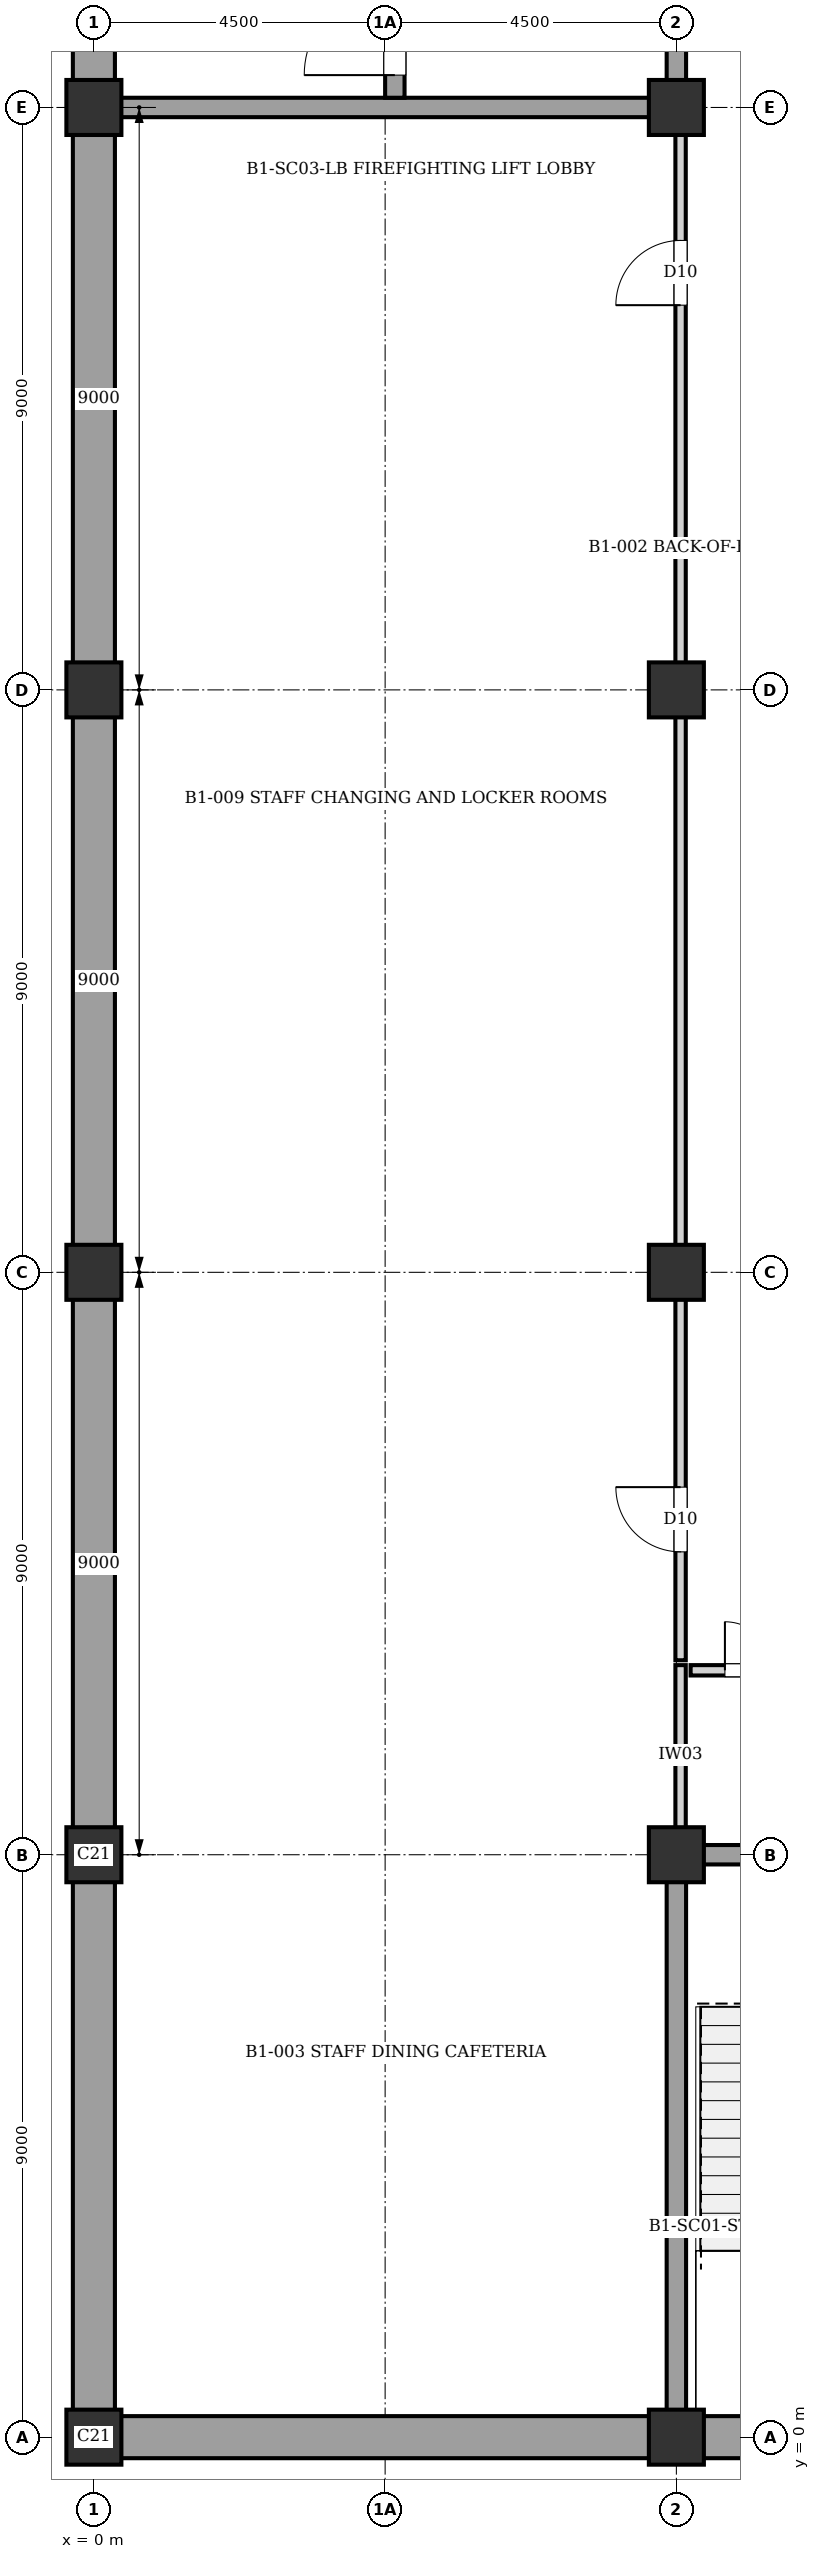
"""IFC4 building model, lengths in metres.
Left out: names, types, materials, properties, quantities, classifications, styles, units other than length and angle.
Written with IfcOpenShell. Run it as: python <this file> out.ifc"""

import sys

from ifc_helpers import new_model, si_unit, direction, frame, frame_2d, origin, origin_2d, place, context, subcontext, project, spatial, rectangle, extrude, element, fill, save


model = new_model("IFC4")
c1 = context("Model", 3, precision=1e-05, world=origin(), true_north=direction((0.0, 1.0)))
c2 = subcontext(c1, "Body", "Model", "MODEL_VIEW")
j1 = project(units=[si_unit("LENGTHUNIT", "METRE"), si_unit("PLANEANGLEUNIT", "RADIAN")], contexts=[c1])
p1 = place(None, origin())
s1 = spatial("IfcSite", under=j1, at=p1, CompositionType="ELEMENT")
p2 = place(p1, origin())
s2 = spatial("IfcBuilding", under=s1, at=p2, CompositionType="ELEMENT")
p3 = place(p2, frame((0.0, 0.0, -4.48)))
s3 = spatial("IfcBuildingStorey", under=s2, at=p3, CompositionType="ELEMENT", Elevation=-4.48)
for number, where, z_axis, x_axis in (
    (1, (0.0, 0.0, 0.0), (0.0, 0.0, 1.0), (1.0, 0.0, 0.0)),
    (2, (0.0, 9.0, 0.0), (0.0, 0.0, 1.0), (1.0, 0.0, 0.0)),
    (3, (0.0, 18.0, 0.0), (0.0, 0.0, 1.0), (1.0, 0.0, 0.0)),
    (4, (0.0, 27.0, 0.0), (0.0, 0.0, 1.0), (1.0, 0.0, 0.0)),
    (5, (0.0, 36.0, 0.0), (0.0, 0.0, 1.0), (1.0, 0.0, 0.0)),
    (6, (9.0, 0.0, 0.0), (0.0, 0.0, 1.0), (1.0, 0.0, 0.0)),
    (7, (9.0, 9.0, 0.0), (0.0, 0.0, 1.0), (1.0, 0.0, 0.0)),
    (8, (9.0, 18.0, 0.0), (0.0, 0.0, 1.0), (1.0, 0.0, 0.0)),
    (9, (9.0, 27.0, 0.0), (0.0, 0.0, 1.0), (1.0, 0.0, 0.0)),
    (10, (9.0, 36.0, 0.0), (0.0, 0.0, 1.0), (1.0, 0.0, 0.0)),
):
    element("IfcColumn", number, at=place(p3, frame(where, z_axis=z_axis, x_axis=x_axis)), inside=s3, PredefinedType="COLUMN", context=c2, shape_type="SweptSolid", body=[
        extrude(rectangle(XDim=0.85, YDim=0.85, at=origin_2d()), origin(), (0.0, 0.0, 1.0), 4.48),
    ])
for number, where, z_axis, x_axis in (
    (11, (18.0, 0.0, 0.0), (0.0, 0.0, 1.0), (-1.0, 0.0, 0.0)),
    (12, (9.0, 0.0, 0.0), (0.0, 0.0, 1.0), (-1.0, 0.0, 0.0)),
    (13, (0.0, 0.0, 0.0), (0.0, 0.0, 1.0), (0.0, 1.0, 0.0)),
    (14, (0.0, 9.0, 0.0), (0.0, 0.0, 1.0), (0.0, 1.0, 0.0)),
    (15, (0.0, 18.0, 0.0), (0.0, 0.0, 1.0), (0.0, 1.0, 0.0)),
    (16, (0.0, 27.0, 0.0), (0.0, 0.0, 1.0), (0.0, 1.0, 0.0)),
    (17, (0.0, 36.0, 0.0), (0.0, 0.0, 1.0), (0.0, 1.0, 0.0)),
):
    element("IfcWall", number, at=place(p3, frame(where, z_axis=z_axis, x_axis=x_axis)), inside=s3, PredefinedType="USERDEFINED", context=c2, shape_type="SweptSolid", body=[
        extrude(rectangle(XDim=9.0, YDim=0.65, at=frame_2d((4.5, 0.0))), origin(), (0.0, 0.0, 1.0), 4.22),
    ])
p4 = place(p3, frame((9.0, 9.0, 0.0), z_axis=(0.0, 0.0, 1.0), x_axis=(1.0, 0.0, 0.0)))
e18 = element("IfcWall", 18, at=p4, inside=s3, PredefinedType="SHEAR", context=c2, shape_type="SweptSolid", body=[
    extrude(rectangle(XDim=9.0, YDim=0.3, at=frame_2d((4.5, 0.0))), origin(), (0.0, 0.0, 1.0), 4.22),
])
p5 = place(p4, frame((5.95, 0.0, 0.0)))
e19 = element("IfcOpeningElement", 19, at=p5, cuts=e18, PredefinedType="OPENING", context=c2, shape_type="SweptSolid", body=[
    extrude(rectangle(XDim=1.6, YDim=2.1, at=frame_2d((0.8, 1.05))), frame((0.0, 0.16, 0.0), z_axis=(0.0, -1.0, 0.0), x_axis=(1.0, 0.0, 0.0)), (0.0, 0.0, 1.0), 0.32),
])
for number, where, z_axis, x_axis in (
    (20, (9.0, 0.0, 0.0), (0.0, 0.0, 1.0), (0.0, 1.0, 0.0)),
    (21, (0.0, 36.0, 0.0), (0.0, 0.0, 1.0), (1.0, 0.0, 0.0)),
):
    element("IfcWall", number, at=place(p3, frame(where, z_axis=z_axis, x_axis=x_axis)), inside=s3, PredefinedType="SHEAR", context=c2, shape_type="SweptSolid", body=[
        extrude(rectangle(XDim=9.0, YDim=0.3, at=frame_2d((4.5, 0.0))), origin(), (0.0, 0.0, 1.0), 4.22),
    ])
p6 = place(p3, frame((9.0, 36.0, 0.0), z_axis=(0.0, 0.0, 1.0), x_axis=(0.0, 1.0, 0.0)))
e22 = element("IfcWall", 22, at=p6, inside=s3, PredefinedType="SHEAR", context=c2, shape_type="SweptSolid", body=[
    extrude(rectangle(XDim=9.0, YDim=0.3, at=frame_2d((4.5, 0.0))), origin(), (0.0, 0.0, 1.0), 4.22),
])
p7 = place(p6, frame((1.95, 0.0, 0.0)))
e23 = element("IfcOpeningElement", 23, at=p7, cuts=e22, PredefinedType="OPENING", context=c2, shape_type="SweptSolid", body=[
    extrude(rectangle(XDim=1.6, YDim=2.1, at=frame_2d((0.8, 1.05))), frame((0.0, 0.16, 0.0), z_axis=(0.0, -1.0, 0.0), x_axis=(1.0, 0.0, 0.0)), (0.0, 0.0, 1.0), 0.32),
])
p8 = place(p3, frame((4.65, 36.15, 0.0), z_axis=(0.0, 0.0, 1.0), x_axis=(0.0, 1.0, 0.0)))
e24 = element("IfcWall", 24, at=p8, inside=s3, PredefinedType="SHEAR", context=c2, shape_type="SweptSolid", body=[
    extrude(rectangle(XDim=8.7, YDim=0.3, at=frame_2d((4.35, 0.0))), origin(), (0.0, 0.0, 1.0), 4.22),
])
p9 = place(p8, frame((0.35, 0.0, 0.0)))
e25 = element("IfcOpeningElement", 25, at=p9, cuts=e24, PredefinedType="OPENING", context=c2, shape_type="SweptSolid", body=[
    extrude(rectangle(XDim=1.4, YDim=2.02, at=frame_2d((0.7, 1.01))), frame((0.0, 0.16, 0.0), z_axis=(0.0, -1.0, 0.0), x_axis=(1.0, 0.0, 0.0)), (0.0, 0.0, 1.0), 0.32),
])
p10 = place(p3, frame((9.065, 9.155, 0.0), z_axis=(0.0, 0.0, 1.0), x_axis=(0.0, 1.0, 0.0)))
e26 = element("IfcWall", 26, at=p10, inside=s3, PredefinedType="PARTITIONING", context=c2, shape_type="SweptSolid", body=[
    extrude(rectangle(XDim=2.775, YDim=0.16, at=frame_2d((1.387, 0.0))), origin(), (0.0, 0.0, 1.0), 3.32),
])
p11 = place(p3, frame((9.22, 11.85, 0.0), z_axis=(0.0, 0.0, 1.0), x_axis=(1.0, 0.0, 0.0)))
e27 = element("IfcWall", 27, at=p11, inside=s3, PredefinedType="PARTITIONING", context=c2, shape_type="SweptSolid", body=[
    extrude(rectangle(XDim=2.56, YDim=0.16, at=frame_2d((1.28, 0.0))), origin(), (0.0, 0.0, 1.0), 4.22),
])
p12 = place(p11, frame((0.53, 0.0, 0.0)))
e28 = element("IfcOpeningElement", 28, at=p12, cuts=e27, PredefinedType="OPENING", context=c2, shape_type="SweptSolid", body=[
    extrude(rectangle(XDim=1.5, YDim=2.1, at=frame_2d((0.75, 1.05))), frame((0.0, 0.09, 0.0), z_axis=(0.0, -1.0, 0.0), x_axis=(1.0, 0.0, 0.0)), (0.0, 0.0, 1.0), 0.18),
])
p13 = place(p3, frame((9.065, 12.005, 0.0), z_axis=(0.0, 0.0, 1.0), x_axis=(0.0, 1.0, 0.0)))
e29 = element("IfcWall", 29, at=p13, inside=s3, PredefinedType="PARTITIONING", context=c2, shape_type="SweptSolid", body=[
    extrude(rectangle(XDim=5.725, YDim=0.16, at=frame_2d((2.863, 0.0))), origin(), (0.0, 0.0, 1.0), 3.32),
])
p14 = place(p13, frame((1.676, 0.0, 0.0)))
e30 = element("IfcOpeningElement", 30, at=p14, cuts=e29, PredefinedType="OPENING", context=c2, shape_type="SweptSolid", body=[
    extrude(rectangle(XDim=1.0, YDim=2.1, at=frame_2d((0.5, 1.05))), frame((0.0, 0.09, 0.0), z_axis=(0.0, -1.0, 0.0), x_axis=(1.0, 0.0, 0.0)), (0.0, 0.0, 1.0), 0.18),
])
p15 = place(p3, frame((9.065, 18.07, 0.0), z_axis=(0.0, 0.0, 1.0), x_axis=(0.0, 1.0, 0.0)))
e31 = element("IfcWall", 31, at=p15, inside=s3, PredefinedType="PARTITIONING", context=c2, shape_type="SweptSolid", body=[
    extrude(rectangle(XDim=17.775, YDim=0.16, at=frame_2d((8.887, 0.0))), origin(), (0.0, 0.0, 1.0), 3.32),
])
p16 = place(p15, frame((14.875, 0.0, 0.0)))
e32 = element("IfcOpeningElement", 32, at=p16, cuts=e31, PredefinedType="OPENING", context=c2, shape_type="SweptSolid", body=[
    extrude(rectangle(XDim=1.0, YDim=2.1, at=frame_2d((0.5, 1.05))), frame((0.0, 0.09, 0.0), z_axis=(0.0, -1.0, 0.0), x_axis=(1.0, 0.0, 0.0)), (0.0, 0.0, 1.0), 0.18),
])
p17 = place(p9, origin())
e33 = element("IfcDoor", 33, at=p17, inside=s3, OperationType="SINGLE_SWING_LEFT", PredefinedType="DOOR", context=c2, shape_type="SweptSolid", body=[
    extrude(rectangle(XDim=1.4, YDim=2.02, at=frame_2d((0.7, 1.01))), frame((0.0, 0.025, 0.0), z_axis=(0.0, -1.0, 0.0), x_axis=(1.0, 0.0, 0.0)), (0.0, 0.0, 1.0), 0.05),
])
fill(e25, e33)
p18 = place(p12, origin())
e34 = element("IfcDoor", 34, at=p18, inside=s3, OperationType="DOUBLE_DOOR_SINGLE_SWING", PredefinedType="DOOR", context=c2, shape_type="SweptSolid", body=[
    extrude(rectangle(XDim=1.5, YDim=2.1, at=frame_2d((0.75, 1.05))), frame((0.0, 0.025, 0.0), z_axis=(0.0, -1.0, 0.0), x_axis=(1.0, 0.0, 0.0)), (0.0, 0.0, 1.0), 0.05),
])
fill(e28, e34)
p19 = place(p14, origin())
e35 = element("IfcDoor", 35, at=p19, inside=s3, OperationType="SINGLE_SWING_RIGHT", PredefinedType="DOOR", context=c2, shape_type="SweptSolid", body=[
    extrude(rectangle(XDim=1.0, YDim=2.1, at=frame_2d((0.5, 1.05))), frame((0.0, 0.025, 0.0), z_axis=(0.0, -1.0, 0.0), x_axis=(1.0, 0.0, 0.0)), (0.0, 0.0, 1.0), 0.05),
])
fill(e30, e35)
p20 = place(p16, origin())
e36 = element("IfcDoor", 36, at=p20, inside=s3, OperationType="SINGLE_SWING_LEFT", PredefinedType="DOOR", context=c2, shape_type="SweptSolid", body=[
    extrude(rectangle(XDim=1.0, YDim=2.1, at=frame_2d((0.5, 1.05))), frame((0.0, 0.025, 0.0), z_axis=(0.0, -1.0, 0.0), x_axis=(1.0, 0.0, 0.0)), (0.0, 0.0, 1.0), 0.05),
])
fill(e32, e36)
save(model, sys.argv[1])
